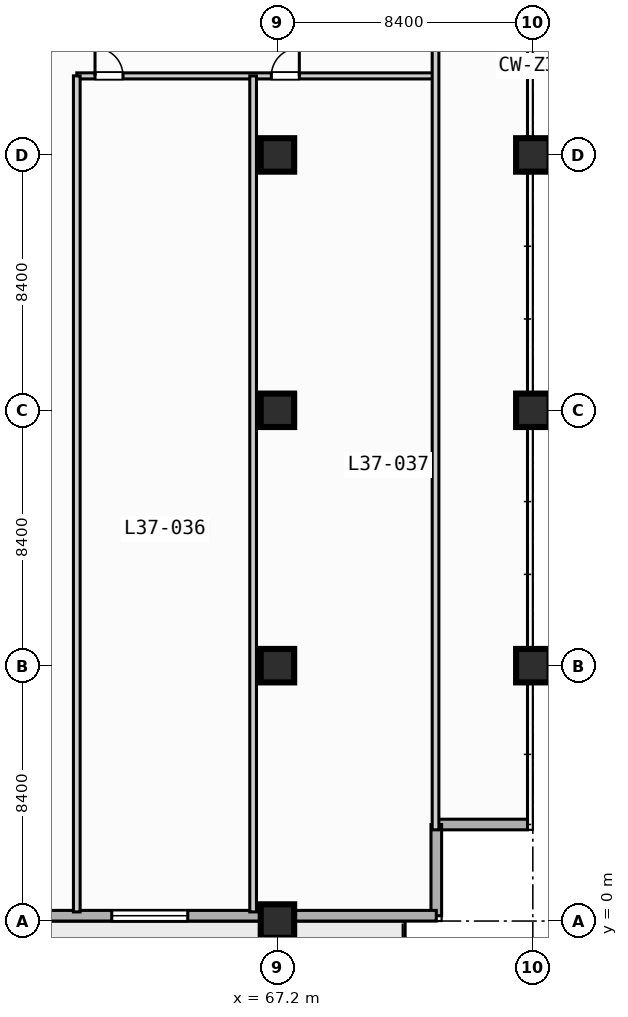
"""IFC4 building model, lengths in metres.
Left out: names, types, materials, properties, quantities, classifications, styles, units other than length and angle.
Written with IfcOpenShell. Run it as: python <this file> out.ifc"""

import sys

from ifc_helpers import new_model, si_unit, direction, frame, frame_2d, origin, origin_2d, place, context, subcontext, project, spatial, rectangle, extrude, element, fill, save


model = new_model("IFC4")
c1 = context("Model", 3, precision=1e-05, world=origin(), true_north=direction((0.0, 1.0)))
c2 = subcontext(c1, "Body", "Model", "MODEL_VIEW")
j1 = project(units=[si_unit("LENGTHUNIT", "METRE"), si_unit("PLANEANGLEUNIT", "RADIAN")], contexts=[c1])
p1 = place(None, origin())
s1 = spatial("IfcSite", under=j1, at=p1, CompositionType="ELEMENT")
p2 = place(p1, origin())
s2 = spatial("IfcBuilding", under=s1, at=p2, CompositionType="ELEMENT")
p3 = place(p2, frame((0.0, 0.0, 153.2)))
s3 = spatial("IfcBuildingStorey", under=s2, at=p3, CompositionType="ELEMENT", Elevation=153.2)
for number, where, z_axis, x_axis in (
    (1, (67.2, 0.0, 0.0), (0.0, 0.0, 1.0), (1.0, 0.0, 0.0)),
    (2, (67.2, 8.4, 0.0), (0.0, 0.0, 1.0), (1.0, 0.0, 0.0)),
    (3, (67.2, 16.8, 0.0), (0.0, 0.0, 1.0), (1.0, 0.0, 0.0)),
    (4, (67.2, 25.2, 0.0), (0.0, 0.0, 1.0), (1.0, 0.0, 0.0)),
    (5, (75.6, 8.4, 0.0), (0.0, 0.0, 1.0), (1.0, 0.0, 0.0)),
    (6, (75.6, 16.8, 0.0), (0.0, 0.0, 1.0), (1.0, 0.0, 0.0)),
    (7, (75.6, 25.2, 0.0), (0.0, 0.0, 1.0), (1.0, 0.0, 0.0)),
):
    element("IfcColumn", number, at=place(p3, frame(where, z_axis=z_axis, x_axis=x_axis)), inside=s3, PredefinedType="COLUMN", context=c2, shape_type="SweptSolid", body=[
        extrude(rectangle(XDim=1.1, YDim=1.1, at=origin_2d()), origin(), (0.0, 0.0, 1.0), 4.4),
    ])
for number, where, z_axis, x_axis in (
    (8, (75.425, 3.175, 0.0), (0.0, 0.0, 1.0), (-1.0, 0.0, 0.0)),
    (9, (72.425, 3.175, 0.0), (0.0, 0.0, 1.0), (0.0, -1.0, 0.0)),
):
    element("IfcWall", number, at=place(p3, frame(where, z_axis=z_axis, x_axis=x_axis)), inside=s3, PredefinedType="STANDARD", context=c2, shape_type="SweptSolid", body=[
        extrude(rectangle(XDim=3.0, YDim=0.35, at=frame_2d((1.5, 0.0))), origin(), (0.0, 0.0, 1.0), 4.15),
    ])
p4 = place(p3, frame((72.425, 0.175, 0.0), z_axis=(0.0, 0.0, 1.0), x_axis=(-1.0, 0.0, 0.0)))
e10 = element("IfcWall", 10, at=p4, inside=s3, PredefinedType="STANDARD", context=c2, shape_type="SweptSolid", body=[
    extrude(rectangle(XDim=69.25, YDim=0.35, at=frame_2d((34.625, 0.0))), origin(), (0.0, 0.0, 1.0), 4.15),
])
p5 = place(p4, frame((50.725, 0.0, 0.0)))
e11 = element("IfcOpeningElement", 11, at=p5, cuts=e10, PredefinedType="OPENING", context=c2, shape_type="SweptSolid", body=[
    extrude(rectangle(XDim=1.4, YDim=2.2, at=frame_2d((0.7, 1.1))), frame((0.0, 0.185, 0.0), z_axis=(0.0, -1.0, 0.0), x_axis=(1.0, 0.0, 0.0)), (0.0, 0.0, 1.0), 0.37),
])
p6 = place(p4, frame((24.975, 0.0, 0.85)))
e12 = element("IfcOpeningElement", 12, at=p6, cuts=e10, PredefinedType="OPENING", context=c2, shape_type="SweptSolid", body=[
    extrude(rectangle(XDim=2.5, YDim=2.2, at=frame_2d((1.25, 1.1))), frame((0.0, 0.185, 0.0), z_axis=(0.0, -1.0, 0.0), x_axis=(1.0, 0.0, 0.0)), (0.0, 0.0, 1.0), 0.37),
])
p7 = place(p4, frame((8.175, 0.0, 0.85)))
e13 = element("IfcOpeningElement", 13, at=p7, cuts=e10, PredefinedType="OPENING", context=c2, shape_type="SweptSolid", body=[
    extrude(rectangle(XDim=2.5, YDim=2.2, at=frame_2d((1.25, 1.1))), frame((0.0, 0.185, 0.0), z_axis=(0.0, -1.0, 0.0), x_axis=(1.0, 0.0, 0.0)), (0.0, 0.0, 1.0), 0.37),
])
p8 = place(p3, frame((60.6, 27.8, 0.0), z_axis=(0.0, 0.0, 1.0), x_axis=(1.0, 0.0, 0.0)))
e14 = element("IfcWall", 14, at=p8, inside=s3, PredefinedType="PARTITIONING", context=c2, shape_type="SweptSolid", body=[
    extrude(rectangle(XDim=11.8, YDim=0.2, at=frame_2d((5.9, 0.0))), origin(), (0.0, 0.0, 1.0), 4.15),
])
p9 = place(p8, frame((0.6, 0.0, 0.0)))
e15 = element("IfcOpeningElement", 15, at=p9, cuts=e14, PredefinedType="OPENING", context=c2, shape_type="SweptSolid", body=[
    extrude(rectangle(XDim=0.92, YDim=2.1, at=frame_2d((0.46, 1.05))), frame((0.0, 0.11, 0.0), z_axis=(0.0, -1.0, 0.0), x_axis=(1.0, 0.0, 0.0)), (0.0, 0.0, 1.0), 0.22),
])
p10 = place(p8, frame((6.4, 0.0, 0.0)))
e16 = element("IfcOpeningElement", 16, at=p10, cuts=e14, PredefinedType="OPENING", context=c2, shape_type="SweptSolid", body=[
    extrude(rectangle(XDim=0.92, YDim=2.1, at=frame_2d((0.46, 1.05))), frame((0.0, 0.11, 0.0), z_axis=(0.0, -1.0, 0.0), x_axis=(1.0, 0.0, 0.0)), (0.0, 0.0, 1.0), 0.22),
])
p11 = place(p3, frame((60.6, 0.3, 0.0), z_axis=(0.0, 0.0, 1.0), x_axis=(0.0, 1.0, 0.0)))
e17 = element("IfcWall", 17, at=p11, inside=s3, PredefinedType="PARTITIONING", context=c2, shape_type="SweptSolid", body=[
    extrude(rectangle(XDim=27.5, YDim=0.22, at=frame_2d((13.75, 0.0))), origin(), (0.0, 0.0, 1.0), 4.15),
])
p12 = place(p3, frame((72.4, 3.0, 0.0), z_axis=(0.0, 0.0, 1.0), x_axis=(0.0, 1.0, 0.0)))
e18 = element("IfcWall", 18, at=p12, inside=s3, PredefinedType="PARTITIONING", context=c2, shape_type="SweptSolid", body=[
    extrude(rectangle(XDim=27.4, YDim=0.22, at=frame_2d((13.7, 0.0))), origin(), (0.0, 0.0, 1.0), 4.15),
])
p13 = place(p3, frame((66.4, 0.3, 0.0), z_axis=(0.0, 0.0, 1.0), x_axis=(0.0, 1.0, 0.0)))
e19 = element("IfcWall", 19, at=p13, inside=s3, PredefinedType="PARTITIONING", context=c2, shape_type="SweptSolid", body=[
    extrude(rectangle(XDim=27.5, YDim=0.22, at=frame_2d((13.75, 0.0))), origin(), (0.0, 0.0, 1.0), 4.15),
])
p14 = place(p7, origin())
e20 = element("IfcWindow", 20, at=p14, inside=s3, PartitioningType="SINGLE_PANEL", PredefinedType="WINDOW", context=c2, shape_type="SweptSolid", body=[
    extrude(rectangle(XDim=2.5, YDim=2.2, at=frame_2d((1.25, 1.1))), frame((0.0, 0.03, 0.0), z_axis=(0.0, -1.0, 0.0), x_axis=(1.0, 0.0, 0.0)), (0.0, 0.0, 1.0), 0.06),
])
fill(e13, e20)
p15 = place(p9, origin())
e21 = element("IfcDoor", 21, at=p15, inside=s3, OperationType="SINGLE_SWING_LEFT", PredefinedType="DOOR", context=c2, shape_type="SweptSolid", body=[
    extrude(rectangle(XDim=0.92, YDim=2.1, at=frame_2d((0.46, 1.05))), frame((0.0, 0.025, 0.0), z_axis=(0.0, -1.0, 0.0), x_axis=(1.0, 0.0, 0.0)), (0.0, 0.0, 1.0), 0.05),
])
fill(e15, e21)
p16 = place(p10, origin())
e22 = element("IfcDoor", 22, at=p16, inside=s3, OperationType="SINGLE_SWING_RIGHT", PredefinedType="DOOR", context=c2, shape_type="SweptSolid", body=[
    extrude(rectangle(XDim=0.92, YDim=2.1, at=frame_2d((0.46, 1.05))), frame((0.0, 0.025, 0.0), z_axis=(0.0, -1.0, 0.0), x_axis=(1.0, 0.0, 0.0)), (0.0, 0.0, 1.0), 0.05),
])
fill(e16, e22)
save(model, sys.argv[1])
